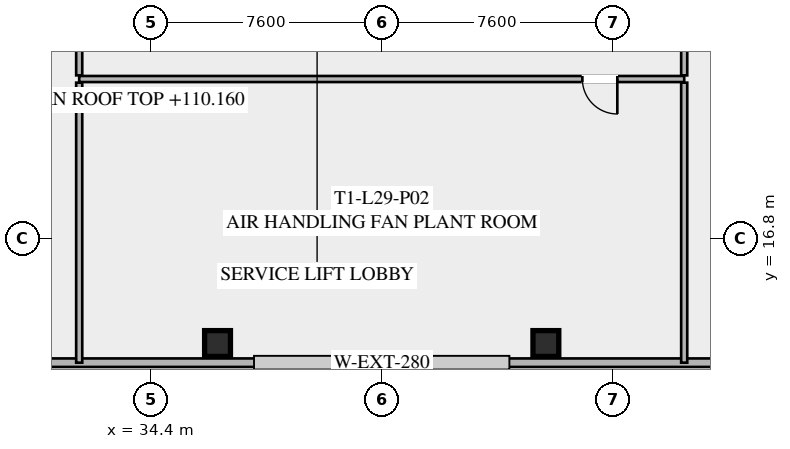
"""IFC4 building model, lengths in metres.
Left out: names, types, materials, properties, quantities, classifications, styles, units other than length and angle.
Written with IfcOpenShell. Run it as: python <this file> out.ifc"""

import sys

from ifc_helpers import new_model, si_unit, direction, frame, frame_2d, origin, origin_2d, place, context, subcontext, project, spatial, rectangle, hollow_rectangle, extrude, element, fill, save


model = new_model("IFC4")
c1 = context("Model", 3, precision=1e-05, world=origin(), true_north=direction((0.0, 1.0)))
c2 = subcontext(c1, "Body", "Model", "MODEL_VIEW")
j1 = project(units=[si_unit("LENGTHUNIT", "METRE"), si_unit("PLANEANGLEUNIT", "RADIAN")], contexts=[c1])
p1 = place(None, origin())
s1 = spatial("IfcSite", under=j1, at=p1, CompositionType="ELEMENT")
p2 = place(p1, origin())
s2 = spatial("IfcBuilding", under=s1, at=p2, CompositionType="ELEMENT")
p3 = place(p2, frame((0.0, 0.0, 109.8)))
s3 = spatial("IfcBuildingStorey", under=s2, at=p3, CompositionType="ELEMENT", Elevation=109.8)
for number, where, z_axis, x_axis in (
    (1, (36.6, 13.35, -0.295), (0.0, 0.0, 1.0), (1.0, 0.0, 0.0)),
    (2, (47.4, 13.35, -0.295), (0.0, 0.0, 1.0), (1.0, 0.0, 0.0)),
):
    element("IfcColumn", number, at=place(p3, frame(where, z_axis=z_axis, x_axis=x_axis)), inside=s3, PredefinedType="COLUMN", context=c2, shape_type="SweptSolid", body=[
        extrude(hollow_rectangle(XDim=0.85, YDim=0.85, WallThickness=0.035, at=origin_2d()), origin(), (0.0, 0.0, 1.0), 4.715),
    ])
p4 = place(p3, frame((58.78, 12.72, 0.0), z_axis=(0.0, 0.0, 1.0), x_axis=(-1.0, 0.0, 0.0)))
e3 = element("IfcWall", 3, at=p4, inside=s3, PredefinedType="SOLIDWALL", context=c2, shape_type="SweptSolid", body=[
    extrude(rectangle(XDim=33.56, YDim=0.28, at=frame_2d((16.78, 0.0))), origin(), (0.0, 0.0, 1.0), 4.42),
])
p5 = place(p3, frame((51.95, 22.05, 0.0), z_axis=(0.0, 0.0, 1.0), x_axis=(-1.0, 0.0, 0.0)))
e4 = element("IfcWall", 4, at=p5, inside=s3, PredefinedType="SOLIDWALL", context=c2, shape_type="SweptSolid", body=[
    extrude(rectangle(XDim=19.9, YDim=0.2, at=frame_2d((9.95, 0.0))), origin(), (0.0, 0.0, 1.0), 3.531),
])
p6 = place(p5, frame((2.2, 0.0, 0.0)))
e5 = element("IfcOpeningElement", 5, at=p6, cuts=e4, PredefinedType="OPENING", context=c2, shape_type="SweptSolid", body=[
    extrude(rectangle(XDim=1.15, YDim=2.2, at=frame_2d((0.575, 1.1))), frame((0.0, 0.11, 0.0), z_axis=(0.0, -1.0, 0.0), x_axis=(1.0, 0.0, 0.0)), (0.0, 0.0, 1.0), 0.22),
])
p7 = place(p3, frame((51.95, 41.83, 0.0), z_axis=(0.0, 0.0, 1.0), x_axis=(0.0, -1.0, 0.0)))
e6 = element("IfcWall", 6, at=p7, inside=s3, PredefinedType="SOLIDWALL", context=c2, shape_type="SweptSolid", body=[
    extrude(rectangle(XDim=19.66, YDim=0.2, at=frame_2d((9.83, 0.0))), origin(), (0.0, 0.0, 1.0), 3.531),
])
p8 = place(p7, frame((3.0, 0.0, 0.0)))
e7 = element("IfcOpeningElement", 7, at=p8, cuts=e6, PredefinedType="OPENING", context=c2, shape_type="SweptSolid", body=[
    extrude(rectangle(XDim=1.25, YDim=2.25, at=frame_2d((0.625, 1.125))), frame((0.0, 0.11, 0.0), z_axis=(0.0, -1.0, 0.0), x_axis=(1.0, 0.0, 0.0)), (0.0, 0.0, 1.0), 0.22),
])
p9 = place(p7, frame((13.2, 0.0, 0.0)))
e8 = element("IfcOpeningElement", 8, at=p9, cuts=e6, PredefinedType="OPENING", context=c2, shape_type="SweptSolid", body=[
    extrude(rectangle(XDim=1.15, YDim=2.2, at=frame_2d((0.575, 1.1))), frame((0.0, 0.11, 0.0), z_axis=(0.0, -1.0, 0.0), x_axis=(1.0, 0.0, 0.0)), (0.0, 0.0, 1.0), 0.22),
])
p10 = place(p3, frame((32.05, 22.17, 0.0), z_axis=(0.0, 0.0, 1.0), x_axis=(0.0, 1.0, 0.0)))
e9 = element("IfcWall", 9, at=p10, inside=s3, PredefinedType="SOLIDWALL", context=c2, shape_type="SweptSolid", body=[
    extrude(rectangle(XDim=6.43, YDim=0.2, at=frame_2d((3.215, 0.0))), origin(), (0.0, 0.0, 1.0), 3.531),
])
p11 = place(p10, frame((3.0, 0.0, 0.0)))
e10 = element("IfcOpeningElement", 10, at=p11, cuts=e9, PredefinedType="OPENING", context=c2, shape_type="SweptSolid", body=[
    extrude(rectangle(XDim=1.25, YDim=2.25, at=frame_2d((0.625, 1.125))), frame((0.0, 0.11, 0.0), z_axis=(0.0, -1.0, 0.0), x_axis=(1.0, 0.0, 0.0)), (0.0, 0.0, 1.0), 0.22),
])
for number, where, z_axis, x_axis in (
    (11, (32.05, 21.93, 0.0), (0.0, 0.0, 1.0), (0.0, -1.0, 0.0)),
    (12, (51.95, 21.93, 0.0), (0.0, 0.0, 1.0), (0.0, -1.0, 0.0)),
):
    element("IfcWall", number, at=place(p3, frame(where, z_axis=z_axis, x_axis=x_axis)), inside=s3, PredefinedType="SOLIDWALL", context=c2, shape_type="SweptSolid", body=[
        extrude(rectangle(XDim=9.21, YDim=0.2, at=frame_2d((4.605, 0.0))), origin(), (0.0, 0.0, 1.0), 3.531),
    ])
p12 = place(p6, origin())
e13 = element("IfcDoor", 13, at=p12, inside=s3, OperationType="SINGLE_SWING_LEFT", PredefinedType="DOOR", context=c2, shape_type="SweptSolid", body=[
    extrude(rectangle(XDim=1.15, YDim=2.2, at=frame_2d((0.575, 1.1))), frame((0.0, 0.025, 0.0), z_axis=(0.0, -1.0, 0.0), x_axis=(1.0, 0.0, 0.0)), (0.0, 0.0, 1.0), 0.05),
])
fill(e5, e13)
save(model, sys.argv[1])
